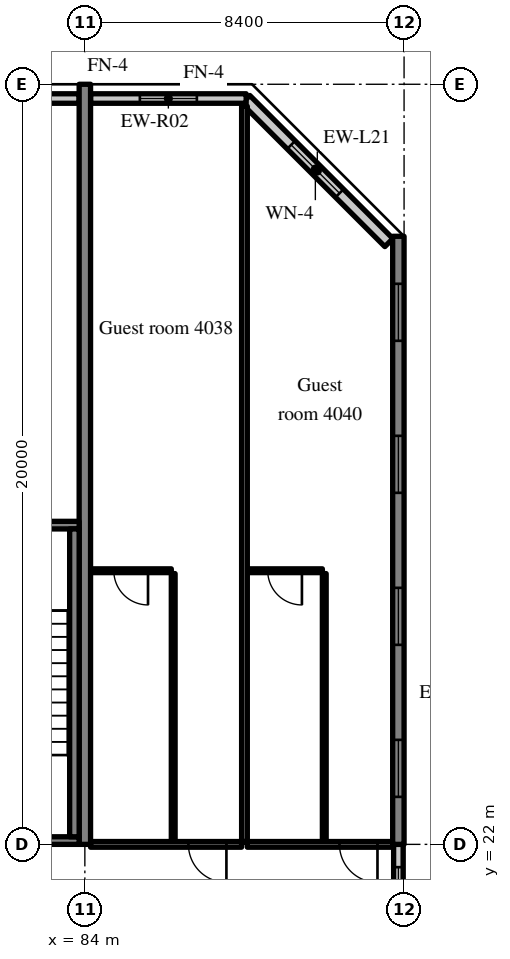
"""IFC4 building model, lengths in metres.
Left out: names, types, materials, properties, quantities, classifications, styles, units other than length and angle.
Written with IfcOpenShell. Run it as: python <this file> out.ifc"""

import sys

from ifc_helpers import new_model, si_unit, direction, frame, frame_2d, origin, place, context, subcontext, project, spatial, rectangle, extrude, source, transform, mapped, element, fill, save


model = new_model("IFC4")
c1 = context("Model", 3, precision=1e-05, world=origin(), true_north=direction((0.0, 1.0)))
c2 = subcontext(c1, "Body", "Model", "MODEL_VIEW")
j1 = project(units=[si_unit("LENGTHUNIT", "METRE"), si_unit("PLANEANGLEUNIT", "RADIAN")], contexts=[c1])
p1 = place(None, origin())
s1 = spatial("IfcSite", under=j1, at=p1, CompositionType="ELEMENT")
p2 = place(p1, origin())
s2 = spatial("IfcBuilding", under=s1, at=p2, CompositionType="ELEMENT")
p3 = place(p2, frame((0.0, 0.0, 166.8)))
s3 = spatial("IfcBuildingStorey", under=s2, at=p3, CompositionType="ELEMENT", Elevation=166.8)
m1 = source(origin(), c2, "Body", "SweptSolid", [
    extrude(rectangle(XDim=20.0, YDim=0.3, at=frame_2d((10.0, 0.0))), origin(), (0.0, 0.0, 1.0), 3.52),
])
p4 = place(p3, frame((84.0, 22.0, 0.0), z_axis=(0.0, 0.0, 1.0), x_axis=(0.0, 1.0, 0.0)))
e1 = element("IfcWall", 1, at=p4, inside=s3, PredefinedType="SHEAR", context=c2, shape_type="MappedRepresentation", body=[
    mapped(m1, transform((0.0, 0.0, 0.0), scale=1.0)),
])
m2 = source(origin(), c2, "Body", "SweptSolid", [
    extrude(rectangle(XDim=16.0, YDim=0.3, at=frame_2d((8.0, 0.0))), origin(), (0.0, 0.0, 1.0), 3.52),
])
p5 = place(p3, frame((92.25, 22.0, 0.0), z_axis=(0.0, 0.0, 1.0), x_axis=(0.0, 1.0, 0.0)))
e2 = element("IfcWall", 2, at=p5, inside=s3, PredefinedType="SHEAR", context=c2, shape_type="MappedRepresentation", body=[
    mapped(m2, transform((0.0, 0.0, 0.0), scale=1.0)),
])
m3 = source(origin(), c2, "Body", "SweptSolid", [
    extrude(rectangle(XDim=1.5, YDim=1.5, at=frame_2d((0.75, 0.75))), frame((0.0, 0.16, 0.0), z_axis=(0.0, -1.0, 0.0), x_axis=(1.0, 0.0, 0.0)), (0.0, 0.0, 1.0), 0.32),
])
p6 = place(p5, frame((1.25, 0.0, 0.9)))
e3 = element("IfcOpeningElement", 3, at=p6, cuts=e2, PredefinedType="OPENING", context=c2, shape_type="MappedRepresentation", body=[
    mapped(m3, transform((0.0, 0.0, 0.0), scale=1.0)),
])
p7 = place(p5, frame((5.25, 0.0, 0.9)))
e4 = element("IfcOpeningElement", 4, at=p7, cuts=e2, PredefinedType="OPENING", context=c2, shape_type="MappedRepresentation", body=[
    mapped(m3, transform((0.0, 0.0, 0.0), scale=1.0)),
])
p8 = place(p5, frame((9.25, 0.0, 0.9)))
e5 = element("IfcOpeningElement", 5, at=p8, cuts=e2, PredefinedType="OPENING", context=c2, shape_type="MappedRepresentation", body=[
    mapped(m3, transform((0.0, 0.0, 0.0), scale=1.0)),
])
p9 = place(p5, frame((13.25, 0.0, 0.9)))
e6 = element("IfcOpeningElement", 6, at=p9, cuts=e2, PredefinedType="OPENING", context=c2, shape_type="MappedRepresentation", body=[
    mapped(m3, transform((0.0, 0.0, 0.0), scale=1.0)),
])
m4 = source(origin(), c2, "Body", "SweptSolid", [
    extrude(rectangle(XDim=5.326, YDim=0.3, at=frame_2d((2.663, 0.0))), origin(), (0.0, 0.0, 1.0), 3.52),
])
p10 = place(p3, frame((92.0, 37.834, 0.0), z_axis=(0.0, 0.0, 1.0), x_axis=(-0.707083859269, 0.707129702361, 0.0)))
e7 = element("IfcWall", 7, at=p10, inside=s3, PredefinedType="SOLIDWALL", context=c2, shape_type="MappedRepresentation", body=[
    mapped(m4, transform((0.0, 0.0, 0.0), scale=1.0)),
])
m5 = source(origin(), c2, "Body", "SweptSolid", [
    extrude(rectangle(XDim=1.8, YDim=1.5, at=frame_2d((0.9, 0.75))), frame((0.0, 0.16, 0.0), z_axis=(0.0, -1.0, 0.0), x_axis=(1.0, 0.0, 0.0)), (0.0, 0.0, 1.0), 0.32),
])
p11 = place(p10, frame((1.836, 0.0, 0.9)))
e8 = element("IfcOpeningElement", 8, at=p11, cuts=e7, PredefinedType="OPENING", context=c2, shape_type="MappedRepresentation", body=[
    mapped(m5, transform((0.0, 0.0, 0.0), scale=1.0)),
])
m6 = source(origin(), c2, "Body", "SweptSolid", [
    extrude(rectangle(XDim=1.708, YDim=0.25, at=frame_2d((0.854, 0.0))), origin(), (0.0, 0.0, 1.0), 2.87),
])
p12 = place(p3, frame((83.85, 41.625, 0.0), z_axis=(0.0, 0.0, 1.0), x_axis=(-1.0, 0.0, 0.0)))
e9 = element("IfcWall", 9, at=p12, inside=s3, PredefinedType="SOLIDWALL", context=c2, shape_type="MappedRepresentation", body=[
    mapped(m6, transform((0.0, 0.0, 0.0), scale=1.0)),
])
m7 = source(origin(), c2, "Body", "SweptSolid", [
    extrude(rectangle(XDim=4.095, YDim=0.25, at=frame_2d((2.047, 0.0))), origin(), (0.0, 0.0, 1.0), 2.87),
])
p13 = place(p3, frame((88.245, 41.625, 0.0), z_axis=(0.0, 0.0, 1.0), x_axis=(-1.0, 0.0, 0.0)))
e10 = element("IfcWall", 10, at=p13, inside=s3, PredefinedType="SOLIDWALL", context=c2, shape_type="MappedRepresentation", body=[
    mapped(m7, transform((0.0, 0.0, 0.0), scale=1.0)),
])
m8 = source(origin(), c2, "Body", "SweptSolid", [
    extrude(rectangle(XDim=1.5, YDim=1.5, at=frame_2d((0.75, 0.75))), frame((0.0, 0.135, 0.0), z_axis=(0.0, -1.0, 0.0), x_axis=(1.0, 0.0, 0.0)), (0.0, 0.0, 1.0), 0.27),
])
p14 = place(p13, frame((1.297, 0.0, 0.9)))
e11 = element("IfcOpeningElement", 11, at=p14, cuts=e10, PredefinedType="OPENING", context=c2, shape_type="MappedRepresentation", body=[
    mapped(m8, transform((0.0, 0.0, 0.0), scale=1.0)),
])
m9 = source(origin(), c2, "Body", "SweptSolid", [
    extrude(rectangle(XDim=2.4, YDim=0.25, at=frame_2d((1.2, 0.0))), origin(), (0.0, 0.0, 1.0), 2.62),
])
p15 = place(p3, frame((92.25, 19.6, 0.0), z_axis=(0.0, 0.0, 1.0), x_axis=(0.0, 1.0, 0.0)))
e12 = element("IfcWall", 12, at=p15, inside=s3, PredefinedType="SOLIDWALL", context=c2, shape_type="MappedRepresentation", body=[
    mapped(m9, transform((0.0, 0.0, 0.0), scale=1.0)),
])
m10 = source(origin(), c2, "Body", "SweptSolid", [
    extrude(rectangle(XDim=1.2, YDim=1.5, at=frame_2d((0.6, 0.75))), frame((0.0, 0.135, 0.0), z_axis=(0.0, -1.0, 0.0), x_axis=(1.0, 0.0, 0.0)), (0.0, 0.0, 1.0), 0.27),
])
p16 = place(p15, frame((0.6, 0.0, 0.9)))
e13 = element("IfcOpeningElement", 13, at=p16, cuts=e12, PredefinedType="OPENING", context=c2, shape_type="MappedRepresentation", body=[
    mapped(m10, transform((0.0, 0.0, 0.0), scale=1.0)),
])
m11 = source(origin(), c2, "Body", "SweptSolid", [
    extrude(rectangle(XDim=8.25, YDim=0.2, at=frame_2d((4.125, 0.0))), origin(), (0.0, 0.0, 1.0), 3.52),
])
p17 = place(p3, frame((83.85, 22.1, 0.0), z_axis=(0.0, 0.0, 1.0), x_axis=(-1.0, 0.0, 0.0)))
e14 = element("IfcWall", 14, at=p17, inside=s3, PredefinedType="SOLIDWALL", context=c2, shape_type="MappedRepresentation", body=[
    mapped(m11, transform((0.0, 0.0, 0.0), scale=1.0)),
])
m12 = source(origin(), c2, "Body", "SweptSolid", [
    extrude(rectangle(XDim=1.2, YDim=2.1, at=frame_2d((0.6, 1.05))), frame((0.0, 0.11, 0.0), z_axis=(0.0, -1.0, 0.0), x_axis=(1.0, 0.0, 0.0)), (0.0, 0.0, 1.0), 0.22),
])
p18 = place(p17, frame((6.05, 0.0, 0.0)))
e15 = element("IfcOpeningElement", 15, at=p18, cuts=e14, PredefinedType="OPENING", context=c2, shape_type="MappedRepresentation", body=[
    mapped(m12, transform((0.0, 0.0, 0.0), scale=1.0)),
])
p19 = place(p3, frame((83.85, 30.4, 0.0), z_axis=(0.0, 0.0, 1.0), x_axis=(-1.0, 0.0, 0.0)))
e16 = element("IfcWall", 16, at=p19, inside=s3, PredefinedType="SOLIDWALL", context=c2, shape_type="MappedRepresentation", body=[
    mapped(m11, transform((0.0, 0.0, 0.0), scale=1.0)),
])
m13 = source(origin(), c2, "Body", "SweptSolid", [
    extrude(rectangle(XDim=1.0, YDim=2.1, at=frame_2d((0.5, 1.05))), frame((0.0, 0.11, 0.0), z_axis=(0.0, -1.0, 0.0), x_axis=(1.0, 0.0, 0.0)), (0.0, 0.0, 1.0), 0.22),
])
p20 = place(p19, frame((6.15, 0.0, 0.0)))
e17 = element("IfcOpeningElement", 17, at=p20, cuts=e16, PredefinedType="OPENING", context=c2, shape_type="MappedRepresentation", body=[
    mapped(m13, transform((0.0, 0.0, 0.0), scale=1.0)),
])
m14 = source(origin(), c2, "Body", "SweptSolid", [
    extrude(rectangle(XDim=8.1, YDim=0.25, at=frame_2d((4.05, 0.0))), origin(), (0.0, 0.0, 1.0), 3.52),
])
p21 = place(p3, frame((83.725, 22.2, 0.0), z_axis=(0.0, 0.0, 1.0), x_axis=(0.0, 1.0, 0.0)))
e18 = element("IfcWall", 18, at=p21, inside=s3, PredefinedType="SOLIDWALL", context=c2, shape_type="MappedRepresentation", body=[
    mapped(m14, transform((0.0, 0.0, 0.0), scale=1.0)),
])
m15 = source(origin(), c2, "Body", "SweptSolid", [
    extrude(rectangle(XDim=7.05, YDim=0.1, at=frame_2d((3.525, 0.0))), origin(), (0.0, 0.0, 1.0), 3.52),
])
p22 = place(p3, frame((86.325, 22.075, 0.0), z_axis=(0.0, 0.0, 1.0), x_axis=(0.0, 1.0, 0.0)))
e19 = element("IfcWall", 19, at=p22, inside=s3, PredefinedType="PARTITIONING", context=c2, shape_type="MappedRepresentation", body=[
    mapped(m15, transform((0.0, 0.0, 0.0), scale=1.0)),
])
m16 = source(origin(), c2, "Body", "SweptSolid", [
    extrude(rectangle(XDim=2.125, YDim=0.1, at=frame_2d((1.062, 0.0))), origin(), (0.0, 0.0, 1.0), 3.52),
])
p23 = place(p3, frame((84.15, 29.2, 0.0), z_axis=(0.0, 0.0, 1.0), x_axis=(1.0, 0.0, 0.0)))
e20 = element("IfcWall", 20, at=p23, inside=s3, PredefinedType="PARTITIONING", context=c2, shape_type="MappedRepresentation", body=[
    mapped(m16, transform((0.0, 0.0, 0.0), scale=1.0)),
])
m17 = source(origin(), c2, "Body", "SweptSolid", [
    extrude(rectangle(XDim=0.9, YDim=2.1, at=frame_2d((0.45, 1.05))), frame((0.0, 0.06, 0.0), z_axis=(0.0, -1.0, 0.0), x_axis=(1.0, 0.0, 0.0)), (0.0, 0.0, 1.0), 0.12),
])
p24 = place(p23, frame((0.612, 0.0, 0.0)))
e21 = element("IfcOpeningElement", 21, at=p24, cuts=e20, PredefinedType="OPENING", context=c2, shape_type="MappedRepresentation", body=[
    mapped(m17, transform((0.0, 0.0, 0.0), scale=1.0)),
])
m18 = source(origin(), c2, "Body", "SweptSolid", [
    extrude(rectangle(XDim=3.975, YDim=0.15, at=frame_2d((1.988, 0.0))), origin(), (0.0, 0.0, 1.0), 2.82),
])
p25 = place(p3, frame((84.15, 22.0, 0.0), z_axis=(0.0, 0.0, 1.0), x_axis=(1.0, 0.0, 0.0)))
e22 = element("IfcWall", 22, at=p25, inside=s3, PredefinedType="PARTITIONING", context=c2, shape_type="MappedRepresentation", body=[
    mapped(m18, transform((0.0, 0.0, 0.0), scale=1.0)),
])
m19 = source(origin(), c2, "Body", "SweptSolid", [
    extrude(rectangle(XDim=1.0, YDim=2.1, at=frame_2d((0.5, 1.05))), frame((0.0, 0.085, 0.0), z_axis=(0.0, -1.0, 0.0), x_axis=(1.0, 0.0, 0.0)), (0.0, 0.0, 1.0), 0.17),
])
p26 = place(p25, frame((2.575, 0.0, 0.0)))
e23 = element("IfcOpeningElement", 23, at=p26, cuts=e22, PredefinedType="OPENING", context=c2, shape_type="MappedRepresentation", body=[
    mapped(m19, transform((0.0, 0.0, 0.0), scale=1.0)),
])
p27 = place(p3, frame((90.3, 22.075, 0.0), z_axis=(0.0, 0.0, 1.0), x_axis=(0.0, 1.0, 0.0)))
e24 = element("IfcWall", 24, at=p27, inside=s3, PredefinedType="PARTITIONING", context=c2, shape_type="MappedRepresentation", body=[
    mapped(m15, transform((0.0, 0.0, 0.0), scale=1.0)),
])
m20 = source(origin(), c2, "Body", "SweptSolid", [
    extrude(rectangle(XDim=1.975, YDim=0.1, at=frame_2d((0.988, 0.0))), origin(), (0.0, 0.0, 1.0), 3.52),
])
p28 = place(p3, frame((88.275, 29.2, 0.0), z_axis=(0.0, 0.0, 1.0), x_axis=(1.0, 0.0, 0.0)))
e25 = element("IfcWall", 25, at=p28, inside=s3, PredefinedType="PARTITIONING", context=c2, shape_type="MappedRepresentation", body=[
    mapped(m20, transform((0.0, 0.0, 0.0), scale=1.0)),
])
p29 = place(p28, frame((0.537, 0.0, 0.0)))
e26 = element("IfcOpeningElement", 26, at=p29, cuts=e25, PredefinedType="OPENING", context=c2, shape_type="MappedRepresentation", body=[
    mapped(m17, transform((0.0, 0.0, 0.0), scale=1.0)),
])
m21 = source(origin(), c2, "Body", "SweptSolid", [
    extrude(rectangle(XDim=3.825, YDim=0.15, at=frame_2d((1.913, 0.0))), origin(), (0.0, 0.0, 1.0), 2.82),
])
p30 = place(p3, frame((88.275, 22.0, 0.0), z_axis=(0.0, 0.0, 1.0), x_axis=(1.0, 0.0, 0.0)))
e27 = element("IfcWall", 27, at=p30, inside=s3, PredefinedType="PARTITIONING", context=c2, shape_type="MappedRepresentation", body=[
    mapped(m21, transform((0.0, 0.0, 0.0), scale=1.0)),
])
p31 = place(p30, frame((2.425, 0.0, 0.0)))
e28 = element("IfcOpeningElement", 28, at=p31, cuts=e27, PredefinedType="OPENING", context=c2, shape_type="MappedRepresentation", body=[
    mapped(m19, transform((0.0, 0.0, 0.0), scale=1.0)),
])
m22 = source(origin(), c2, "Body", "SweptSolid", [
    extrude(rectangle(XDim=19.347, YDim=0.15, at=frame_2d((9.674, 0.0))), origin(), (0.0, 0.0, 1.0), 3.52),
])
p32 = place(p3, frame((88.2, 22.075, 0.0), z_axis=(0.0, 0.0, 1.0), x_axis=(0.0, 1.0, 0.0)))
e29 = element("IfcWall", 29, at=p32, inside=s3, PredefinedType="PARTITIONING", context=c2, shape_type="MappedRepresentation", body=[
    mapped(m22, transform((0.0, 0.0, 0.0), scale=1.0)),
])
m23 = source(origin(), c2, "Body", "SweptSolid", [
    extrude(rectangle(XDim=1.8, YDim=1.5, at=frame_2d((0.9, 0.75))), frame((0.0, 0.03, 0.0), z_axis=(0.0, -1.0, 0.0), x_axis=(1.0, 0.0, 0.0)), (0.0, 0.0, 1.0), 0.06),
])
p33 = place(p11, origin())
e30 = element("IfcWindow", 30, at=p33, inside=s3, PartitioningType="SINGLE_PANEL", PredefinedType="WINDOW", context=c2, shape_type="MappedRepresentation", body=[
    mapped(m23, transform((0.0, 0.0, 0.0), scale=1.0)),
])
fill(e8, e30)
m24 = source(origin(), c2, "Body", "SweptSolid", [
    extrude(rectangle(XDim=1.5, YDim=1.5, at=frame_2d((0.75, 0.75))), frame((0.0, 0.03, 0.0), z_axis=(0.0, -1.0, 0.0), x_axis=(1.0, 0.0, 0.0)), (0.0, 0.0, 1.0), 0.06),
])
p34 = place(p14, origin())
e31 = element("IfcWindow", 31, at=p34, inside=s3, PartitioningType="SINGLE_PANEL", PredefinedType="WINDOW", context=c2, shape_type="MappedRepresentation", body=[
    mapped(m24, transform((0.0, 0.0, 0.0), scale=1.0)),
])
fill(e11, e31)
p35 = place(p6, origin())
e32 = element("IfcWindow", 32, at=p35, inside=s3, PartitioningType="SINGLE_PANEL", PredefinedType="WINDOW", context=c2, shape_type="MappedRepresentation", body=[
    mapped(m24, transform((0.0, 0.0, 0.0), scale=1.0)),
])
fill(e3, e32)
p36 = place(p7, origin())
e33 = element("IfcWindow", 33, at=p36, inside=s3, PartitioningType="SINGLE_PANEL", PredefinedType="WINDOW", context=c2, shape_type="MappedRepresentation", body=[
    mapped(m24, transform((0.0, 0.0, 0.0), scale=1.0)),
])
fill(e4, e33)
p37 = place(p8, origin())
e34 = element("IfcWindow", 34, at=p37, inside=s3, PartitioningType="SINGLE_PANEL", PredefinedType="WINDOW", context=c2, shape_type="MappedRepresentation", body=[
    mapped(m24, transform((0.0, 0.0, 0.0), scale=1.0)),
])
fill(e5, e34)
p38 = place(p9, origin())
e35 = element("IfcWindow", 35, at=p38, inside=s3, PartitioningType="SINGLE_PANEL", PredefinedType="WINDOW", context=c2, shape_type="MappedRepresentation", body=[
    mapped(m24, transform((0.0, 0.0, 0.0), scale=1.0)),
])
fill(e6, e35)
m25 = source(origin(), c2, "Body", "SweptSolid", [
    extrude(rectangle(XDim=1.2, YDim=1.5, at=frame_2d((0.6, 0.75))), frame((0.0, 0.03, 0.0), z_axis=(0.0, -1.0, 0.0), x_axis=(1.0, 0.0, 0.0)), (0.0, 0.0, 1.0), 0.06),
])
p39 = place(p16, origin())
e36 = element("IfcWindow", 36, at=p39, inside=s3, PartitioningType="SINGLE_PANEL", PredefinedType="WINDOW", context=c2, shape_type="MappedRepresentation", body=[
    mapped(m25, transform((0.0, 0.0, 0.0), scale=1.0)),
])
fill(e13, e36)
m26 = source(origin(), c2, "Body", "SweptSolid", [
    extrude(rectangle(XDim=0.9, YDim=2.1, at=frame_2d((0.45, 1.05))), frame((0.0, 0.025, 0.0), z_axis=(0.0, -1.0, 0.0), x_axis=(1.0, 0.0, 0.0)), (0.0, 0.0, 1.0), 0.05),
])
p40 = place(p24, origin())
e37 = element("IfcDoor", 37, at=p40, inside=s3, OperationType="SINGLE_SWING_RIGHT", PredefinedType="DOOR", context=c2, shape_type="MappedRepresentation", body=[
    mapped(m26, transform((0.0, 0.0, 0.0), scale=1.0)),
])
fill(e21, e37)
m27 = source(origin(), c2, "Body", "SweptSolid", [
    extrude(rectangle(XDim=1.0, YDim=2.1, at=frame_2d((0.5, 1.05))), frame((0.0, 0.025, 0.0), z_axis=(0.0, -1.0, 0.0), x_axis=(1.0, 0.0, 0.0)), (0.0, 0.0, 1.0), 0.05),
])
p41 = place(p26, origin())
e38 = element("IfcDoor", 38, at=p41, inside=s3, OperationType="SINGLE_SWING_RIGHT", PredefinedType="DOOR", context=c2, shape_type="MappedRepresentation", body=[
    mapped(m27, transform((0.0, 0.0, 0.0), scale=1.0)),
])
fill(e23, e38)
p42 = place(p29, origin())
e39 = element("IfcDoor", 39, at=p42, inside=s3, OperationType="SINGLE_SWING_RIGHT", PredefinedType="DOOR", context=c2, shape_type="MappedRepresentation", body=[
    mapped(m26, transform((0.0, 0.0, 0.0), scale=1.0)),
])
fill(e26, e39)
p43 = place(p31, origin())
e40 = element("IfcDoor", 40, at=p43, inside=s3, OperationType="SINGLE_SWING_RIGHT", PredefinedType="DOOR", context=c2, shape_type="MappedRepresentation", body=[
    mapped(m27, transform((0.0, 0.0, 0.0), scale=1.0)),
])
fill(e28, e40)
save(model, sys.argv[1])
